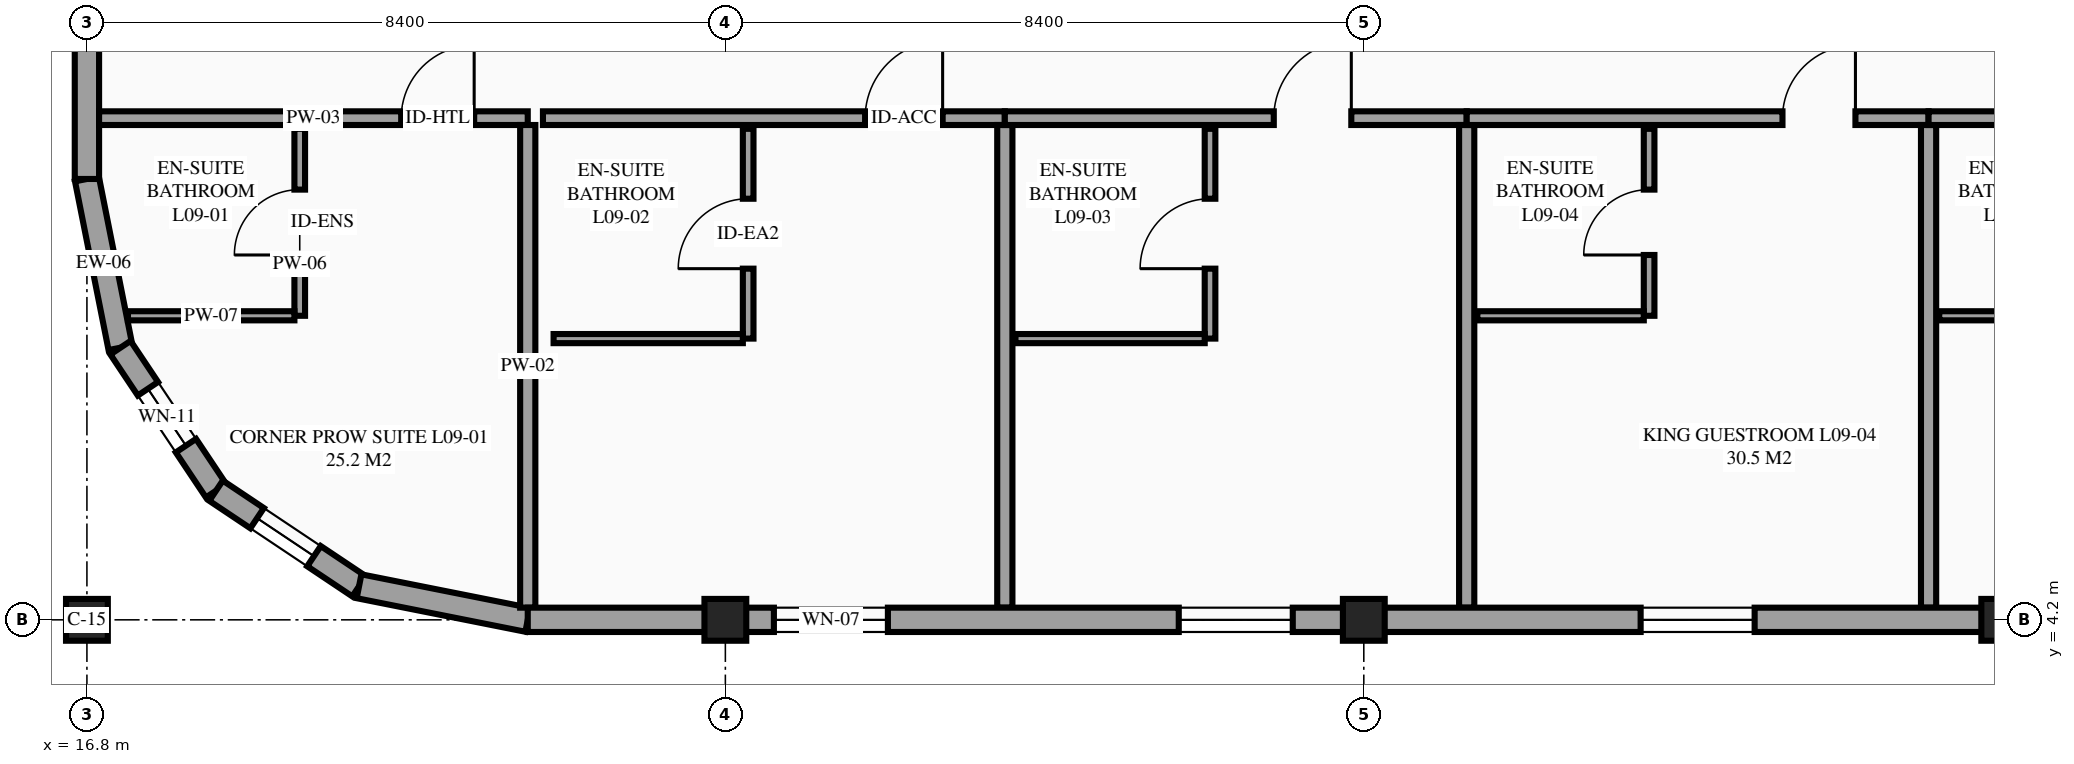
"""IFC4 building model, lengths in metres.
Left out: names, types, materials, properties, quantities, classifications, styles, units other than length and angle.
Written with IfcOpenShell. Run it as: python <this file> out.ifc"""

import sys

from ifc_helpers import new_model, si_unit, direction, frame, frame_2d, origin, origin_2d, place, context, subcontext, project, spatial, rectangle, extrude, element, fill, save


model = new_model("IFC4")
c1 = context("Model", 3, precision=1e-05, world=origin(), true_north=direction((0.0, 1.0)))
c2 = subcontext(c1, "Body", "Model", "MODEL_VIEW")
j1 = project(units=[si_unit("LENGTHUNIT", "METRE"), si_unit("PLANEANGLEUNIT", "RADIAN")], contexts=[c1])
p1 = place(None, origin())
s1 = spatial("IfcSite", under=j1, at=p1, CompositionType="ELEMENT")
p2 = place(p1, origin())
s2 = spatial("IfcBuilding", under=s1, at=p2, CompositionType="ELEMENT")
p3 = place(p2, frame((0.0, 0.0, 36.3)))
s3 = spatial("IfcBuildingStorey", under=s2, at=p3, CompositionType="ELEMENT", Elevation=36.3)
for number, where, z_axis, x_axis in (
    (1, (16.8, 4.2, 0.0), (0.0, 0.0, 1.0), (1.0, 0.0, 0.0)),
    (2, (25.2, 4.2, 0.0), (0.0, 0.0, 1.0), (1.0, 0.0, 0.0)),
    (3, (33.6, 4.2, 0.0), (0.0, 0.0, 1.0), (1.0, 0.0, 0.0)),
    (4, (42.0, 4.2, 0.0), (0.0, 0.0, 1.0), (1.0, 0.0, 0.0)),
):
    element("IfcColumn", number, at=place(p3, frame(where, z_axis=z_axis, x_axis=x_axis)), inside=s3, PredefinedType="COLUMN", context=c2, shape_type="SweptSolid", body=[
        extrude(rectangle(XDim=0.55, YDim=0.55, at=origin_2d()), origin(), (0.0, 0.0, 1.0), 3.6),
    ])
p4 = place(p3, frame((16.8, 10.0, 0.0), z_axis=(0.0, 0.0, 1.0), x_axis=(0.195057908159, -0.980791727363, 0.0)))
e5 = element("IfcWall", 5, at=p4, inside=s3, PredefinedType="STANDARD", context=c2, shape_type="SweptSolid", body=[
    extrude(rectangle(XDim=2.263, YDim=0.32, at=frame_2d((1.131, 0.0))), origin(), (0.0, 0.0, 1.0), 2.73),
])
p5 = place(p3, frame((17.241, 7.781, 0.0), z_axis=(0.0, 0.0, 1.0), x_axis=(0.555546297918, -0.831485604728, 0.0)))
e6 = element("IfcWall", 6, at=p5, inside=s3, PredefinedType="STANDARD", context=c2, shape_type="SweptSolid", body=[
    extrude(rectangle(XDim=2.263, YDim=0.32, at=frame_2d((1.132, 0.0))), origin(), (0.0, 0.0, 1.0), 3.6),
])
p6 = place(p5, frame((0.65, 0.0, 0.75)))
e7 = element("IfcOpeningElement", 7, at=p6, cuts=e6, PredefinedType="OPENING", context=c2, shape_type="SweptSolid", body=[
    extrude(rectangle(XDim=0.9, YDim=1.55, at=frame_2d((0.45, 0.775))), frame((0.0, 0.17, 0.0), z_axis=(0.0, -1.0, 0.0), x_axis=(1.0, 0.0, 0.0)), (0.0, 0.0, 1.0), 0.34),
])
p7 = place(p3, frame((18.499, 5.899, 0.0), z_axis=(0.0, 0.0, 1.0), x_axis=(0.831502143458, -0.555521543618, 0.0)))
e8 = element("IfcWall", 8, at=p7, inside=s3, PredefinedType="STANDARD", context=c2, shape_type="SweptSolid", body=[
    extrude(rectangle(XDim=2.263, YDim=0.32, at=frame_2d((1.131, 0.0))), origin(), (0.0, 0.0, 1.0), 3.6),
])
p8 = place(p7, frame((0.65, 0.0, 0.75)))
e9 = element("IfcOpeningElement", 9, at=p8, cuts=e8, PredefinedType="OPENING", context=c2, shape_type="SweptSolid", body=[
    extrude(rectangle(XDim=0.9, YDim=1.55, at=frame_2d((0.45, 0.775))), frame((0.0, 0.17, 0.0), z_axis=(0.0, -1.0, 0.0), x_axis=(1.0, 0.0, 0.0)), (0.0, 0.0, 1.0), 0.34),
])
p9 = place(p3, frame((20.38, 4.642, 0.0), z_axis=(0.0, 0.0, 1.0), x_axis=(0.98077519094, -0.195141038321, 0.0)))
e10 = element("IfcWall", 10, at=p9, inside=s3, PredefinedType="STANDARD", context=c2, shape_type="SweptSolid", body=[
    extrude(rectangle(XDim=2.263, YDim=0.32, at=frame_2d((1.132, 0.0))), origin(), (0.0, 0.0, 1.0), 3.075),
])
p10 = place(p3, frame((16.8, 21.0, 0.0), z_axis=(0.0, 0.0, 1.0), x_axis=(0.0, -1.0, 0.0)))
e11 = element("IfcWall", 11, at=p10, inside=s3, PredefinedType="STANDARD", context=c2, shape_type="SweptSolid", body=[
    extrude(rectangle(XDim=11.0, YDim=0.32, at=frame_2d((5.5, 0.0))), origin(), (0.0, 0.0, 1.0), 2.68),
])
p11 = place(p3, frame((16.96, 10.8, 0.0), z_axis=(0.0, 0.0, 1.0), x_axis=(1.0, 0.0, 0.0)))
e12 = element("IfcWall", 12, at=p11, inside=s3, PredefinedType="PARTITIONING", context=c2, shape_type="SweptSolid", body=[
    extrude(rectangle(XDim=5.64, YDim=0.18, at=frame_2d((2.82, 0.0))), origin(), (0.0, 0.0, 1.0), 3.375),
])
p12 = place(p11, frame((3.975, 0.0, 0.0)))
e13 = element("IfcOpeningElement", 13, at=p12, cuts=e12, PredefinedType="OPENING", context=c2, shape_type="SweptSolid", body=[
    extrude(rectangle(XDim=0.96, YDim=2.15, at=frame_2d((0.48, 1.075))), frame((0.0, 0.1, 0.0), z_axis=(0.0, -1.0, 0.0), x_axis=(1.0, 0.0, 0.0)), (0.0, 0.0, 1.0), 0.2),
])
p13 = place(p3, frame((22.6, 4.36, 0.0), z_axis=(0.0, 0.0, 1.0), x_axis=(0.0, 1.0, 0.0)))
e14 = element("IfcWall", 14, at=p13, inside=s3, PredefinedType="PARTITIONING", context=c2, shape_type="SweptSolid", body=[
    extrude(rectangle(XDim=6.35, YDim=0.2, at=frame_2d((3.175, 0.0))), origin(), (0.0, 0.0, 1.0), 3.375),
])
p14 = place(p3, frame((19.6, 8.2, 0.0), z_axis=(0.0, 0.0, 1.0), x_axis=(0.0, 1.0, 0.0)))
e15 = element("IfcWall", 15, at=p14, inside=s3, PredefinedType="PARTITIONING", context=c2, shape_type="SweptSolid", body=[
    extrude(rectangle(XDim=2.46, YDim=0.14, at=frame_2d((1.23, 0.0))), origin(), (0.0, 0.0, 1.0), 3.375),
])
p15 = place(p14, frame((0.8, 0.0, 0.0)))
e16 = element("IfcOpeningElement", 16, at=p15, cuts=e15, PredefinedType="OPENING", context=c2, shape_type="SweptSolid", body=[
    extrude(rectangle(XDim=0.86, YDim=2.1, at=frame_2d((0.43, 1.05))), frame((0.0, 0.08, 0.0), z_axis=(0.0, -1.0, 0.0), x_axis=(1.0, 0.0, 0.0)), (0.0, 0.0, 1.0), 0.16),
])
p16 = place(p3, frame((17.34, 8.2, 0.0), z_axis=(0.0, 0.0, 1.0), x_axis=(1.0, 0.0, 0.0)))
e17 = element("IfcWall", 17, at=p16, inside=s3, PredefinedType="PARTITIONING", context=c2, shape_type="SweptSolid", body=[
    extrude(rectangle(XDim=2.19, YDim=0.12, at=frame_2d((1.095, 0.0))), origin(), (0.0, 0.0, 1.0), 3.375),
])
p17 = place(p3, frame((22.8, 10.8, 0.0), z_axis=(0.0, 0.0, 1.0), x_axis=(1.0, 0.0, 0.0)))
e18 = element("IfcWall", 18, at=p17, inside=s3, PredefinedType="PARTITIONING", context=c2, shape_type="SweptSolid", body=[
    extrude(rectangle(XDim=6.077, YDim=0.18, at=frame_2d((3.039, 0.0))), origin(), (0.0, 0.0, 1.0), 3.375),
])
p18 = place(p17, frame((4.239, 0.0, 0.0)))
e19 = element("IfcOpeningElement", 19, at=p18, cuts=e18, PredefinedType="OPENING", context=c2, shape_type="SweptSolid", body=[
    extrude(rectangle(XDim=1.02, YDim=2.15, at=frame_2d((0.51, 1.075))), frame((0.0, 0.1, 0.0), z_axis=(0.0, -1.0, 0.0), x_axis=(1.0, 0.0, 0.0)), (0.0, 0.0, 1.0), 0.2),
])
p19 = place(p3, frame((28.877, 4.36, 0.0), z_axis=(0.0, 0.0, 1.0), x_axis=(0.0, 1.0, 0.0)))
e20 = element("IfcWall", 20, at=p19, inside=s3, PredefinedType="PARTITIONING", context=c2, shape_type="SweptSolid", body=[
    extrude(rectangle(XDim=6.35, YDim=0.2, at=frame_2d((3.175, 0.0))), origin(), (0.0, 0.0, 1.0), 3.375),
])
p20 = place(p3, frame((25.5, 7.9, 0.0), z_axis=(0.0, 0.0, 1.0), x_axis=(0.0, 1.0, 0.0)))
e21 = element("IfcWall", 21, at=p20, inside=s3, PredefinedType="PARTITIONING", context=c2, shape_type="SweptSolid", body=[
    extrude(rectangle(XDim=2.76, YDim=0.14, at=frame_2d((1.38, 0.0))), origin(), (0.0, 0.0, 1.0), 3.375),
])
p21 = place(p20, frame((0.92, 0.0, 0.0)))
e22 = element("IfcOpeningElement", 22, at=p21, cuts=e21, PredefinedType="OPENING", context=c2, shape_type="SweptSolid", body=[
    extrude(rectangle(XDim=0.92, YDim=2.1, at=frame_2d((0.46, 1.05))), frame((0.0, 0.08, 0.0), z_axis=(0.0, -1.0, 0.0), x_axis=(1.0, 0.0, 0.0)), (0.0, 0.0, 1.0), 0.16),
])
p22 = place(p3, frame((22.94, 7.9, 0.0), z_axis=(0.0, 0.0, 1.0), x_axis=(1.0, 0.0, 0.0)))
e23 = element("IfcWall", 23, at=p22, inside=s3, PredefinedType="PARTITIONING", context=c2, shape_type="SweptSolid", body=[
    extrude(rectangle(XDim=2.49, YDim=0.12, at=frame_2d((1.245, 0.0))), origin(), (0.0, 0.0, 1.0), 3.375),
])
p23 = place(p3, frame((28.877, 10.8, 0.0), z_axis=(0.0, 0.0, 1.0), x_axis=(1.0, 0.0, 0.0)))
e24 = element("IfcWall", 24, at=p23, inside=s3, PredefinedType="PARTITIONING", context=c2, shape_type="SweptSolid", body=[
    extrude(rectangle(XDim=6.077, YDim=0.18, at=frame_2d((3.039, 0.0))), origin(), (0.0, 0.0, 1.0), 3.375),
])
p24 = place(p23, frame((3.539, 0.0, 0.0)))
e25 = element("IfcOpeningElement", 25, at=p24, cuts=e24, PredefinedType="OPENING", context=c2, shape_type="SweptSolid", body=[
    extrude(rectangle(XDim=1.02, YDim=2.15, at=frame_2d((0.51, 1.075))), frame((0.0, 0.1, 0.0), z_axis=(0.0, -1.0, 0.0), x_axis=(1.0, 0.0, 0.0)), (0.0, 0.0, 1.0), 0.2),
])
p25 = place(p3, frame((34.954, 4.36, 0.0), z_axis=(0.0, 0.0, 1.0), x_axis=(0.0, 1.0, 0.0)))
e26 = element("IfcWall", 26, at=p25, inside=s3, PredefinedType="PARTITIONING", context=c2, shape_type="SweptSolid", body=[
    extrude(rectangle(XDim=6.35, YDim=0.2, at=frame_2d((3.175, 0.0))), origin(), (0.0, 0.0, 1.0), 3.375),
])
p26 = place(p3, frame((31.577, 7.9, 0.0), z_axis=(0.0, 0.0, 1.0), x_axis=(0.0, 1.0, 0.0)))
e27 = element("IfcWall", 27, at=p26, inside=s3, PredefinedType="PARTITIONING", context=c2, shape_type="SweptSolid", body=[
    extrude(rectangle(XDim=2.76, YDim=0.14, at=frame_2d((1.38, 0.0))), origin(), (0.0, 0.0, 1.0), 3.375),
])
p27 = place(p26, frame((0.92, 0.0, 0.0)))
e28 = element("IfcOpeningElement", 28, at=p27, cuts=e27, PredefinedType="OPENING", context=c2, shape_type="SweptSolid", body=[
    extrude(rectangle(XDim=0.92, YDim=2.1, at=frame_2d((0.46, 1.05))), frame((0.0, 0.08, 0.0), z_axis=(0.0, -1.0, 0.0), x_axis=(1.0, 0.0, 0.0)), (0.0, 0.0, 1.0), 0.16),
])
p28 = place(p3, frame((29.017, 7.9, 0.0), z_axis=(0.0, 0.0, 1.0), x_axis=(1.0, 0.0, 0.0)))
e29 = element("IfcWall", 29, at=p28, inside=s3, PredefinedType="PARTITIONING", context=c2, shape_type="SweptSolid", body=[
    extrude(rectangle(XDim=2.49, YDim=0.12, at=frame_2d((1.245, 0.0))), origin(), (0.0, 0.0, 1.0), 3.375),
])
p29 = place(p3, frame((34.954, 10.8, 0.0), z_axis=(0.0, 0.0, 1.0), x_axis=(1.0, 0.0, 0.0)))
e30 = element("IfcWall", 30, at=p29, inside=s3, PredefinedType="PARTITIONING", context=c2, shape_type="SweptSolid", body=[
    extrude(rectangle(XDim=6.077, YDim=0.18, at=frame_2d((3.039, 0.0))), origin(), (0.0, 0.0, 1.0), 3.375),
])
p30 = place(p29, frame((4.155, 0.0, 0.0)))
e31 = element("IfcOpeningElement", 31, at=p30, cuts=e30, PredefinedType="OPENING", context=c2, shape_type="SweptSolid", body=[
    extrude(rectangle(XDim=0.96, YDim=2.15, at=frame_2d((0.48, 1.075))), frame((0.0, 0.1, 0.0), z_axis=(0.0, -1.0, 0.0), x_axis=(1.0, 0.0, 0.0)), (0.0, 0.0, 1.0), 0.2),
])
p31 = place(p3, frame((41.031, 4.36, 0.0), z_axis=(0.0, 0.0, 1.0), x_axis=(0.0, 1.0, 0.0)))
e32 = element("IfcWall", 32, at=p31, inside=s3, PredefinedType="PARTITIONING", context=c2, shape_type="SweptSolid", body=[
    extrude(rectangle(XDim=6.35, YDim=0.2, at=frame_2d((3.175, 0.0))), origin(), (0.0, 0.0, 1.0), 3.375),
])
p32 = place(p3, frame((37.354, 8.2, 0.0), z_axis=(0.0, 0.0, 1.0), x_axis=(0.0, 1.0, 0.0)))
e33 = element("IfcWall", 33, at=p32, inside=s3, PredefinedType="PARTITIONING", context=c2, shape_type="SweptSolid", body=[
    extrude(rectangle(XDim=2.46, YDim=0.14, at=frame_2d((1.23, 0.0))), origin(), (0.0, 0.0, 1.0), 3.375),
])
p33 = place(p32, frame((0.8, 0.0, 0.0)))
e34 = element("IfcOpeningElement", 34, at=p33, cuts=e33, PredefinedType="OPENING", context=c2, shape_type="SweptSolid", body=[
    extrude(rectangle(XDim=0.86, YDim=2.1, at=frame_2d((0.43, 1.05))), frame((0.0, 0.08, 0.0), z_axis=(0.0, -1.0, 0.0), x_axis=(1.0, 0.0, 0.0)), (0.0, 0.0, 1.0), 0.16),
])
p34 = place(p3, frame((35.094, 8.2, 0.0), z_axis=(0.0, 0.0, 1.0), x_axis=(1.0, 0.0, 0.0)))
e35 = element("IfcWall", 35, at=p34, inside=s3, PredefinedType="PARTITIONING", context=c2, shape_type="SweptSolid", body=[
    extrude(rectangle(XDim=2.19, YDim=0.12, at=frame_2d((1.095, 0.0))), origin(), (0.0, 0.0, 1.0), 3.375),
])
p35 = place(p3, frame((41.031, 10.8, 0.0), z_axis=(0.0, 0.0, 1.0), x_axis=(1.0, 0.0, 0.0)))
e36 = element("IfcWall", 36, at=p35, inside=s3, PredefinedType="PARTITIONING", context=c2, shape_type="SweptSolid", body=[
    extrude(rectangle(XDim=6.077, YDim=0.18, at=frame_2d((3.039, 0.0))), origin(), (0.0, 0.0, 1.0), 3.375),
])
p36 = place(p35, frame((4.155, 0.0, 0.0)))
e37 = element("IfcOpeningElement", 37, at=p36, cuts=e36, PredefinedType="OPENING", context=c2, shape_type="SweptSolid", body=[
    extrude(rectangle(XDim=0.96, YDim=2.15, at=frame_2d((0.48, 1.075))), frame((0.0, 0.1, 0.0), z_axis=(0.0, -1.0, 0.0), x_axis=(1.0, 0.0, 0.0)), (0.0, 0.0, 1.0), 0.2),
])
p37 = place(p3, frame((41.171, 8.2, 0.0), z_axis=(0.0, 0.0, 1.0), x_axis=(1.0, 0.0, 0.0)))
e38 = element("IfcWall", 38, at=p37, inside=s3, PredefinedType="PARTITIONING", context=c2, shape_type="SweptSolid", body=[
    extrude(rectangle(XDim=2.19, YDim=0.12, at=frame_2d((1.095, 0.0))), origin(), (0.0, 0.0, 1.0), 3.375),
])
p38 = place(p3, frame((22.6, 4.2, 0.0), z_axis=(0.0, 0.0, 1.0), x_axis=(1.0, 0.0, 0.0)))
e39 = element("IfcWall", 39, at=p38, inside=s3, PredefinedType="STANDARD", context=c2, shape_type="SweptSolid", body=[
    extrude(rectangle(XDim=2.6, YDim=0.32, at=frame_2d((1.3, 0.0))), origin(), (0.0, 0.0, 1.0), 3.075),
])
p39 = place(p3, frame((25.2, 4.2, 0.0), z_axis=(0.0, 0.0, 1.0), x_axis=(1.0, 0.0, 0.0)))
e40 = element("IfcWall", 40, at=p39, inside=s3, PredefinedType="STANDARD", context=c2, shape_type="SweptSolid", body=[
    extrude(rectangle(XDim=16.8, YDim=0.32, at=frame_2d((8.4, 0.0))), origin(), (0.0, 0.0, 1.0), 2.53),
])
p40 = place(p39, frame((0.638, 0.0, 0.85)))
e41 = element("IfcOpeningElement", 41, at=p40, cuts=e40, PredefinedType="OPENING", context=c2, shape_type="SweptSolid", body=[
    extrude(rectangle(XDim=1.5, YDim=1.5, at=frame_2d((0.75, 0.75))), frame((0.0, 0.17, 0.0), z_axis=(0.0, -1.0, 0.0), x_axis=(1.0, 0.0, 0.0)), (0.0, 0.0, 1.0), 0.34),
])
p41 = place(p39, frame((5.965, 0.0, 0.85)))
e42 = element("IfcOpeningElement", 42, at=p41, cuts=e40, PredefinedType="OPENING", context=c2, shape_type="SweptSolid", body=[
    extrude(rectangle(XDim=1.5, YDim=1.5, at=frame_2d((0.75, 0.75))), frame((0.0, 0.17, 0.0), z_axis=(0.0, -1.0, 0.0), x_axis=(1.0, 0.0, 0.0)), (0.0, 0.0, 1.0), 0.34),
])
p42 = place(p39, frame((12.042, 0.0, 0.85)))
e43 = element("IfcOpeningElement", 43, at=p42, cuts=e40, PredefinedType="OPENING", context=c2, shape_type="SweptSolid", body=[
    extrude(rectangle(XDim=1.5, YDim=1.5, at=frame_2d((0.75, 0.75))), frame((0.0, 0.17, 0.0), z_axis=(0.0, -1.0, 0.0), x_axis=(1.0, 0.0, 0.0)), (0.0, 0.0, 1.0), 0.34),
])
p43 = place(p6, origin())
e44 = element("IfcWindow", 44, at=p43, inside=s3, PartitioningType="SINGLE_PANEL", PredefinedType="WINDOW", context=c2, shape_type="SweptSolid", body=[
    extrude(rectangle(XDim=0.9, YDim=1.55, at=frame_2d((0.45, 0.775))), frame((0.0, 0.03, 0.0), z_axis=(0.0, -1.0, 0.0), x_axis=(1.0, 0.0, 0.0)), (0.0, 0.0, 1.0), 0.06),
])
fill(e7, e44)
p44 = place(p8, origin())
e45 = element("IfcWindow", 45, at=p44, inside=s3, PartitioningType="SINGLE_PANEL", PredefinedType="WINDOW", context=c2, shape_type="SweptSolid", body=[
    extrude(rectangle(XDim=0.9, YDim=1.55, at=frame_2d((0.45, 0.775))), frame((0.0, 0.03, 0.0), z_axis=(0.0, -1.0, 0.0), x_axis=(1.0, 0.0, 0.0)), (0.0, 0.0, 1.0), 0.06),
])
fill(e9, e45)
p45 = place(p40, origin())
e46 = element("IfcWindow", 46, at=p45, inside=s3, PartitioningType="SINGLE_PANEL", PredefinedType="WINDOW", context=c2, shape_type="SweptSolid", body=[
    extrude(rectangle(XDim=1.5, YDim=1.5, at=frame_2d((0.75, 0.75))), frame((0.0, 0.03, 0.0), z_axis=(0.0, -1.0, 0.0), x_axis=(1.0, 0.0, 0.0)), (0.0, 0.0, 1.0), 0.06),
])
fill(e41, e46)
p46 = place(p41, origin())
e47 = element("IfcWindow", 47, at=p46, inside=s3, PartitioningType="SINGLE_PANEL", PredefinedType="WINDOW", context=c2, shape_type="SweptSolid", body=[
    extrude(rectangle(XDim=1.5, YDim=1.5, at=frame_2d((0.75, 0.75))), frame((0.0, 0.03, 0.0), z_axis=(0.0, -1.0, 0.0), x_axis=(1.0, 0.0, 0.0)), (0.0, 0.0, 1.0), 0.06),
])
fill(e42, e47)
p47 = place(p42, origin())
e48 = element("IfcWindow", 48, at=p47, inside=s3, PartitioningType="SINGLE_PANEL", PredefinedType="WINDOW", context=c2, shape_type="SweptSolid", body=[
    extrude(rectangle(XDim=1.5, YDim=1.5, at=frame_2d((0.75, 0.75))), frame((0.0, 0.03, 0.0), z_axis=(0.0, -1.0, 0.0), x_axis=(1.0, 0.0, 0.0)), (0.0, 0.0, 1.0), 0.06),
])
fill(e43, e48)
p48 = place(p12, origin())
e49 = element("IfcDoor", 49, at=p48, inside=s3, OperationType="SINGLE_SWING_RIGHT", PredefinedType="DOOR", context=c2, shape_type="SweptSolid", body=[
    extrude(rectangle(XDim=0.96, YDim=2.15, at=frame_2d((0.48, 1.075))), frame((0.0, 0.025, 0.0), z_axis=(0.0, -1.0, 0.0), x_axis=(1.0, 0.0, 0.0)), (0.0, 0.0, 1.0), 0.05),
])
fill(e13, e49)
p49 = place(p15, origin())
e50 = element("IfcDoor", 50, at=p49, inside=s3, OperationType="SINGLE_SWING_LEFT", PredefinedType="DOOR", context=c2, shape_type="SweptSolid", body=[
    extrude(rectangle(XDim=0.86, YDim=2.1, at=frame_2d((0.43, 1.05))), frame((0.0, 0.025, 0.0), z_axis=(0.0, -1.0, 0.0), x_axis=(1.0, 0.0, 0.0)), (0.0, 0.0, 1.0), 0.05),
])
fill(e16, e50)
p50 = place(p18, origin())
e51 = element("IfcDoor", 51, at=p50, inside=s3, OperationType="SINGLE_SWING_RIGHT", PredefinedType="DOOR", context=c2, shape_type="SweptSolid", body=[
    extrude(rectangle(XDim=1.02, YDim=2.15, at=frame_2d((0.51, 1.075))), frame((0.0, 0.025, 0.0), z_axis=(0.0, -1.0, 0.0), x_axis=(1.0, 0.0, 0.0)), (0.0, 0.0, 1.0), 0.05),
])
fill(e19, e51)
p51 = place(p21, origin())
e52 = element("IfcDoor", 52, at=p51, inside=s3, OperationType="SINGLE_SWING_LEFT", PredefinedType="DOOR", context=c2, shape_type="SweptSolid", body=[
    extrude(rectangle(XDim=0.92, YDim=2.1, at=frame_2d((0.46, 1.05))), frame((0.0, 0.025, 0.0), z_axis=(0.0, -1.0, 0.0), x_axis=(1.0, 0.0, 0.0)), (0.0, 0.0, 1.0), 0.05),
])
fill(e22, e52)
p52 = place(p24, origin())
e53 = element("IfcDoor", 53, at=p52, inside=s3, OperationType="SINGLE_SWING_RIGHT", PredefinedType="DOOR", context=c2, shape_type="SweptSolid", body=[
    extrude(rectangle(XDim=1.02, YDim=2.15, at=frame_2d((0.51, 1.075))), frame((0.0, 0.025, 0.0), z_axis=(0.0, -1.0, 0.0), x_axis=(1.0, 0.0, 0.0)), (0.0, 0.0, 1.0), 0.05),
])
fill(e25, e53)
p53 = place(p27, origin())
e54 = element("IfcDoor", 54, at=p53, inside=s3, OperationType="SINGLE_SWING_LEFT", PredefinedType="DOOR", context=c2, shape_type="SweptSolid", body=[
    extrude(rectangle(XDim=0.92, YDim=2.1, at=frame_2d((0.46, 1.05))), frame((0.0, 0.025, 0.0), z_axis=(0.0, -1.0, 0.0), x_axis=(1.0, 0.0, 0.0)), (0.0, 0.0, 1.0), 0.05),
])
fill(e28, e54)
p54 = place(p30, origin())
e55 = element("IfcDoor", 55, at=p54, inside=s3, OperationType="SINGLE_SWING_RIGHT", PredefinedType="DOOR", context=c2, shape_type="SweptSolid", body=[
    extrude(rectangle(XDim=0.96, YDim=2.15, at=frame_2d((0.48, 1.075))), frame((0.0, 0.025, 0.0), z_axis=(0.0, -1.0, 0.0), x_axis=(1.0, 0.0, 0.0)), (0.0, 0.0, 1.0), 0.05),
])
fill(e31, e55)
p55 = place(p33, origin())
e56 = element("IfcDoor", 56, at=p55, inside=s3, OperationType="SINGLE_SWING_LEFT", PredefinedType="DOOR", context=c2, shape_type="SweptSolid", body=[
    extrude(rectangle(XDim=0.86, YDim=2.1, at=frame_2d((0.43, 1.05))), frame((0.0, 0.025, 0.0), z_axis=(0.0, -1.0, 0.0), x_axis=(1.0, 0.0, 0.0)), (0.0, 0.0, 1.0), 0.05),
])
fill(e34, e56)
save(model, sys.argv[1])
